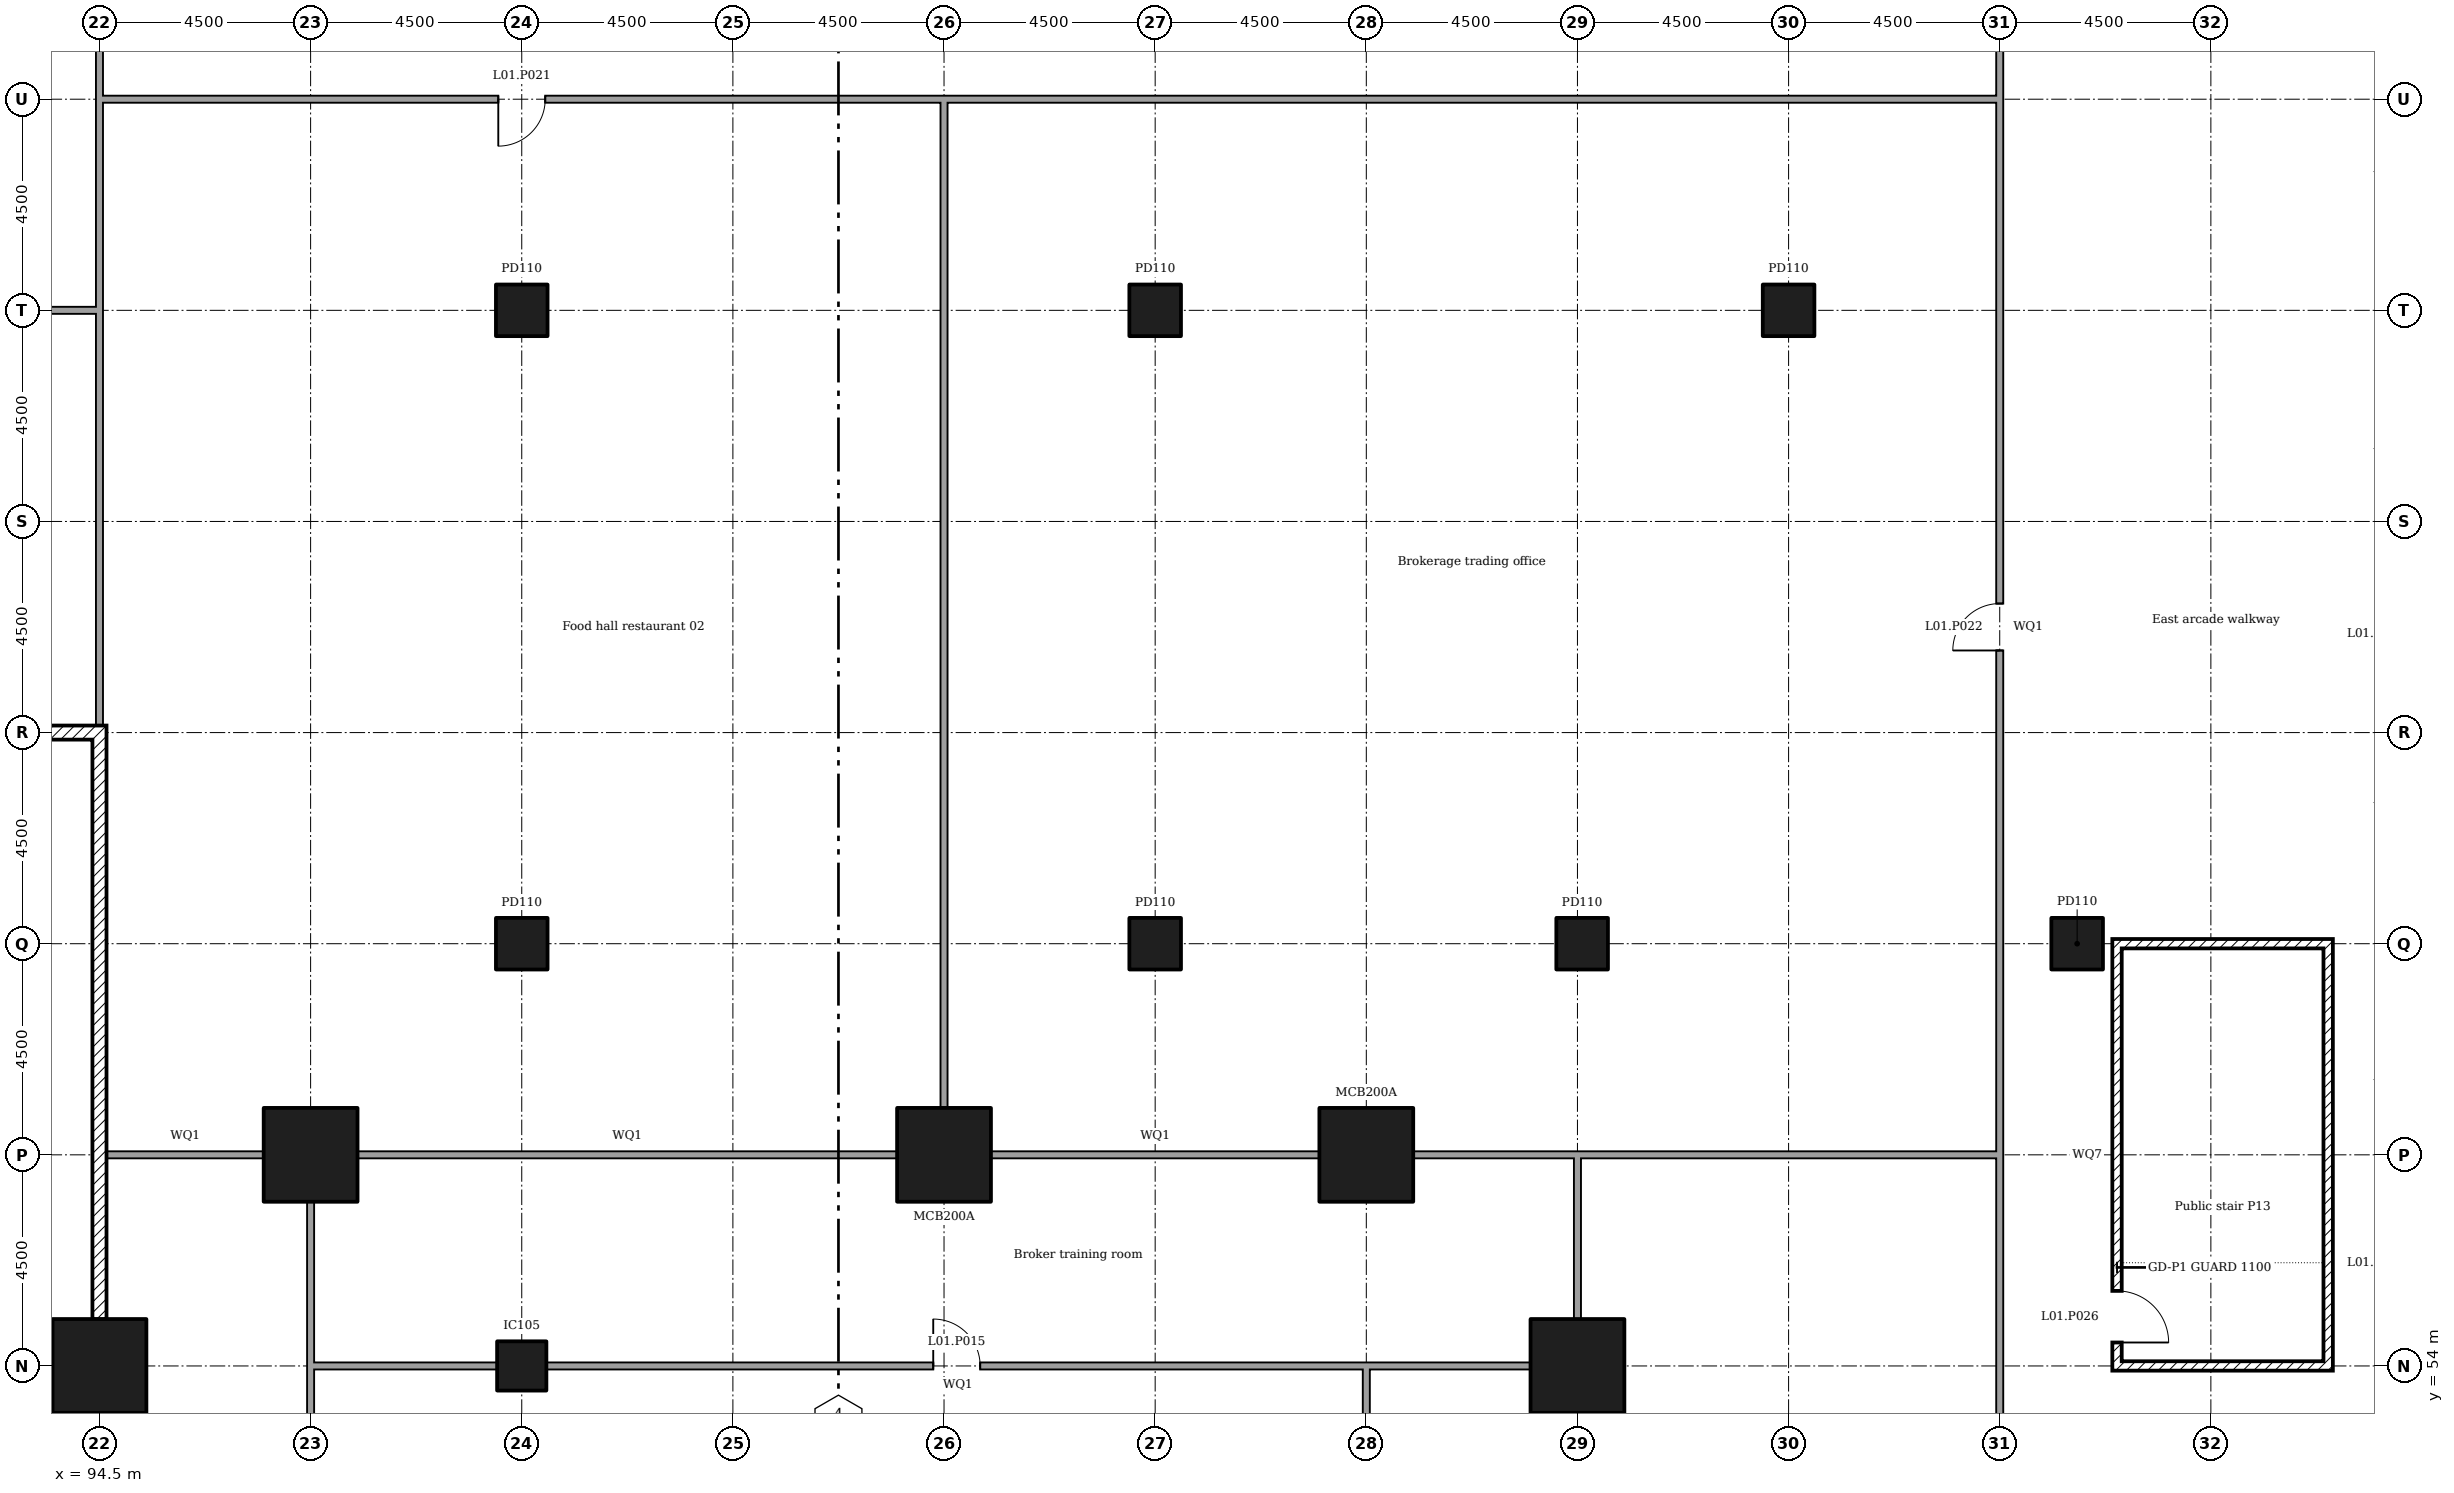
"""IFC4 building model, lengths in metres.
Left out: names, types, materials, properties, quantities, classifications, styles, units other than length and angle.
Written with IfcOpenShell. Run it as: python <this file> out.ifc"""

import sys

from ifc_helpers import new_model, si_unit, direction, frame, frame_2d, origin, origin_2d, place, context, subcontext, project, spatial, rectangle, extrude, element, fill, save


model = new_model("IFC4")
c1 = context("Model", 3, precision=1e-05, world=origin(), true_north=direction((0.0, 1.0)))
c2 = subcontext(c1, "Body", "Model", "MODEL_VIEW")
j1 = project(units=[si_unit("LENGTHUNIT", "METRE"), si_unit("PLANEANGLEUNIT", "RADIAN")], contexts=[c1])
p1 = place(None, origin())
s1 = spatial("IfcSite", under=j1, at=p1, CompositionType="ELEMENT")
p2 = place(p1, origin())
s2 = spatial("IfcBuilding", under=s1, at=p2, CompositionType="ELEMENT")
p3 = place(p2, frame((0.0, 0.0, 6.0)))
s3 = spatial("IfcBuildingStorey", under=s2, at=p3, CompositionType="ELEMENT", Elevation=6.0)
for number, where in (
    (1, (94.5, 54.0, 0.0)),
    (2, (99.0, 58.5, 0.0)),
    (3, (112.5, 58.5, 0.0)),
    (4, (121.5, 58.5, 0.0)),
    (5, (126.0, 54.0, 0.0)),
):
    element("IfcColumn", number, at=place(p3, frame(where)), inside=s3, PredefinedType="COLUMN", context=c2, shape_type="SweptSolid", body=[
        extrude(rectangle(XDim=2.0, YDim=2.0, at=origin_2d()), origin(), (0.0, 0.0, 1.0), 5.5),
    ])
p4 = place(p3, frame((103.5, 54.0, 0.0)))
e6 = element("IfcColumn", 6, at=p4, inside=s3, PredefinedType="COLUMN", context=c2, shape_type="SweptSolid", body=[
    extrude(rectangle(XDim=1.05, YDim=1.05, at=origin_2d()), origin(), (0.0, 0.0, 1.0), 5.5),
])
for number, where in (
    (7, (103.5, 63.0, 0.0)),
    (8, (103.5, 76.5, 0.0)),
    (9, (117.0, 63.0, 0.0)),
    (10, (117.0, 76.5, 0.0)),
    (11, (126.1, 63.0, 0.0)),
    (12, (130.5, 76.5, 0.0)),
    (13, (136.65, 63.0, 0.0)),
):
    element("IfcColumn", number, at=place(p3, frame(where)), inside=s3, PredefinedType="COLUMN", context=c2, shape_type="SweptSolid", body=[
        extrude(rectangle(XDim=1.1, YDim=1.1, at=origin_2d()), origin(), (0.0, 0.0, 1.0), 5.5),
    ])
p5 = place(p3, frame((81.6, 67.5, 0.0)))
e14 = element("IfcWall", 14, at=p5, inside=s3, PredefinedType="SOLIDWALL", context=c2, shape_type="SweptSolid", body=[
    extrude(rectangle(XDim=13.05, YDim=0.3, at=frame_2d((6.525, 0.0))), origin(), (0.0, 0.0, 1.0), 5.5),
])
p6 = place(p5, frame((5.6, 0.0, 0.0)))
e15 = element("IfcOpeningElement", 15, at=p6, cuts=e14, PredefinedType="OPENING", context=c2, shape_type="SweptSolid", body=[
    extrude(rectangle(XDim=1.8, YDim=2.1, at=frame_2d((0.9, 1.05))), frame((0.0, 0.16, 0.0), z_axis=(0.0, -1.0, 0.0), x_axis=(1.0, 0.0, 0.0)), (0.0, 0.0, 1.0), 0.32),
])
p7 = place(p3, frame((94.5, 45.995, 0.0), z_axis=(0.0, 0.0, 1.0), x_axis=(0.0, 1.0, 0.0)))
e16 = element("IfcWall", 16, at=p7, inside=s3, PredefinedType="SOLIDWALL", context=c2, shape_type="SweptSolid", body=[
    extrude(rectangle(XDim=7.01, YDim=0.3, at=frame_2d((3.505, 0.0))), origin(), (0.0, 0.0, 1.0), 10.05),
])
p8 = place(p7, frame((2.6, 0.0, 0.0)))
e17 = element("IfcOpeningElement", 17, at=p8, cuts=e16, PredefinedType="OPENING", context=c2, shape_type="SweptSolid", body=[
    extrude(rectangle(XDim=1.8, YDim=2.1, at=frame_2d((0.9, 1.05))), frame((0.0, 0.16, 0.0), z_axis=(0.0, -1.0, 0.0), x_axis=(1.0, 0.0, 0.0)), (0.0, 0.0, 1.0), 0.32),
])
p9 = place(p3, frame((94.5, 54.995, 0.0), z_axis=(0.0, 0.0, 1.0), x_axis=(0.0, 1.0, 0.0)))
e18 = element("IfcWall", 18, at=p9, inside=s3, PredefinedType="SOLIDWALL", context=c2, shape_type="SweptSolid", body=[
    extrude(rectangle(XDim=3.58, YDim=0.3, at=frame_2d((1.79, 0.0))), origin(), (0.0, 0.0, 1.0), 10.05),
])
p10 = place(p3, frame((94.5, 58.425, 0.0), z_axis=(0.0, 0.0, 1.0), x_axis=(0.0, 1.0, 0.0)))
e19 = element("IfcWall", 19, at=p10, inside=s3, PredefinedType="SOLIDWALL", context=c2, shape_type="SweptSolid", body=[
    extrude(rectangle(XDim=8.925, YDim=0.3, at=frame_2d((4.462, 0.0))), origin(), (0.0, 0.0, 1.0), 10.05),
])
p11 = place(p3, frame((90.545, 76.5, 0.0)))
e20 = element("IfcWall", 20, at=p11, inside=s3, PredefinedType="PARTITIONING", context=c2, shape_type="SweptSolid", body=[
    extrude(rectangle(XDim=4.03, YDim=0.15, at=frame_2d((2.015, 0.0))), origin(), (0.0, 0.0, 1.0), 5.05),
])
p12 = place(p11, frame((1.1, 0.0, 0.0)))
e21 = element("IfcOpeningElement", 21, at=p12, cuts=e20, PredefinedType="OPENING", context=c2, shape_type="SweptSolid", body=[
    extrude(rectangle(XDim=1.8, YDim=2.1, at=frame_2d((0.9, 1.05))), frame((0.0, 0.085, 0.0), z_axis=(0.0, -1.0, 0.0), x_axis=(1.0, 0.0, 0.0)), (0.0, 0.0, 1.0), 0.17),
])
p13 = place(p3, frame((94.5, 67.5, 0.0), z_axis=(0.0, 0.0, 1.0), x_axis=(0.0, 1.0, 0.0)))
e22 = element("IfcWall", 22, at=p13, inside=s3, PredefinedType="PARTITIONING", context=c2, shape_type="SweptSolid", body=[
    extrude(rectangle(XDim=8.925, YDim=0.15, at=frame_2d((4.462, 0.0))), origin(), (0.0, 0.0, 1.0), 5.05),
])
p14 = place(p3, frame((94.5, 80.925, 0.0), z_axis=(0.0, 0.0, 1.0), x_axis=(0.0, 1.0, 0.0)))
e23 = element("IfcWall", 23, at=p14, inside=s3, PredefinedType="PARTITIONING", context=c2, shape_type="SweptSolid", body=[
    extrude(rectangle(XDim=8.775, YDim=0.15, at=frame_2d((4.387, 0.0))), origin(), (0.0, 0.0, 1.0), 5.05),
])
p15 = place(p14, frame((3.525, 0.0, 0.0)))
e24 = element("IfcOpeningElement", 24, at=p15, cuts=e23, PredefinedType="OPENING", context=c2, shape_type="SweptSolid", body=[
    extrude(rectangle(XDim=1.8, YDim=2.1, at=frame_2d((0.9, 1.05))), frame((0.0, 0.085, 0.0), z_axis=(0.0, -1.0, 0.0), x_axis=(1.0, 0.0, 0.0)), (0.0, 0.0, 1.0), 0.17),
])
p16 = place(p3, frame((94.5, 76.5, 0.0), z_axis=(0.0, 0.0, 1.0), x_axis=(0.0, 1.0, 0.0)))
e25 = element("IfcWall", 25, at=p16, inside=s3, PredefinedType="PARTITIONING", context=c2, shape_type="SweptSolid", body=[
    extrude(rectangle(XDim=4.5, YDim=0.15, at=frame_2d((2.25, 0.0))), origin(), (0.0, 0.0, 1.0), 5.05),
])
p17 = place(p3, frame((135.0, 80.925, 0.0), z_axis=(0.0, 0.0, 1.0), x_axis=(0.0, 1.0, 0.0)))
e26 = element("IfcWall", 26, at=p17, inside=s3, PredefinedType="PARTITIONING", context=c2, shape_type="SweptSolid", body=[
    extrude(rectangle(XDim=8.775, YDim=0.15, at=frame_2d((4.387, 0.0))), origin(), (0.0, 0.0, 1.0), 5.05),
])
p18 = place(p17, frame((3.525, 0.0, 0.0)))
e27 = element("IfcOpeningElement", 27, at=p18, cuts=e26, PredefinedType="OPENING", context=c2, shape_type="SweptSolid", body=[
    extrude(rectangle(XDim=1.8, YDim=2.1, at=frame_2d((0.9, 1.05))), frame((0.0, 0.085, 0.0), z_axis=(0.0, -1.0, 0.0), x_axis=(1.0, 0.0, 0.0)), (0.0, 0.0, 1.0), 0.17),
])
p19 = place(p3, frame((135.0, 40.5, 0.0), z_axis=(0.0, 0.0, 1.0), x_axis=(0.0, 1.0, 0.0)))
e28 = element("IfcWall", 28, at=p19, inside=s3, PredefinedType="PARTITIONING", context=c2, shape_type="SweptSolid", body=[
    extrude(rectangle(XDim=18.075, YDim=0.15, at=frame_2d((9.038, 0.0))), origin(), (0.0, 0.0, 1.0), 5.05),
])
p20 = place(p19, frame((7.3, 0.0, 0.0)))
e29 = element("IfcOpeningElement", 29, at=p20, cuts=e28, PredefinedType="OPENING", context=c2, shape_type="SweptSolid", body=[
    extrude(rectangle(XDim=1.0, YDim=2.1, at=frame_2d((0.5, 1.05))), frame((0.0, 0.085, 0.0), z_axis=(0.0, -1.0, 0.0), x_axis=(1.0, 0.0, 0.0)), (0.0, 0.0, 1.0), 0.17),
])
p21 = place(p3, frame((135.0, 58.5, 0.0), z_axis=(0.0, 0.0, 1.0), x_axis=(0.0, 1.0, 0.0)))
e30 = element("IfcWall", 30, at=p21, inside=s3, PredefinedType="PARTITIONING", context=c2, shape_type="SweptSolid", body=[
    extrude(rectangle(XDim=22.5, YDim=0.15, at=frame_2d((11.25, 0.0))), origin(), (0.0, 0.0, 1.0), 5.05),
])
p22 = place(p21, frame((10.75, 0.0, 0.0)))
e31 = element("IfcOpeningElement", 31, at=p22, cuts=e30, PredefinedType="OPENING", context=c2, shape_type="SweptSolid", body=[
    extrude(rectangle(XDim=1.0, YDim=2.1, at=frame_2d((0.5, 1.05))), frame((0.0, 0.085, 0.0), z_axis=(0.0, -1.0, 0.0), x_axis=(1.0, 0.0, 0.0)), (0.0, 0.0, 1.0), 0.17),
])
p23 = place(p3, frame((137.5, 53.9, 0.0), z_axis=(0.0, 0.0, 1.0), x_axis=(0.0, 1.0, 0.0)))
e32 = element("IfcWall", 32, at=p23, inside=s3, PredefinedType="SOLIDWALL", context=c2, shape_type="SweptSolid", body=[
    extrude(rectangle(XDim=9.2, YDim=0.2, at=frame_2d((4.6, 0.0))), origin(), (0.0, 0.0, 1.0), 5.05),
])
p24 = place(p23, frame((0.6, 0.0, 0.0)))
e33 = element("IfcOpeningElement", 33, at=p24, cuts=e32, PredefinedType="OPENING", context=c2, shape_type="SweptSolid", body=[
    extrude(rectangle(XDim=1.1, YDim=2.1, at=frame_2d((0.55, 1.05))), frame((0.0, 0.11, 0.0), z_axis=(0.0, -1.0, 0.0), x_axis=(1.0, 0.0, 0.0)), (0.0, 0.0, 1.0), 0.22),
])
p25 = place(p3, frame((142.0, 53.9, 0.0), z_axis=(0.0, 0.0, 1.0), x_axis=(0.0, 1.0, 0.0)))
e34 = element("IfcWall", 34, at=p25, inside=s3, PredefinedType="SOLIDWALL", context=c2, shape_type="SweptSolid", body=[
    extrude(rectangle(XDim=9.2, YDim=0.2, at=frame_2d((4.6, 0.0))), origin(), (0.0, 0.0, 1.0), 5.05),
])
for number, where in (
    (35, (137.6, 54.0, 0.0)),
    (36, (137.6, 63.0, 0.0)),
):
    element("IfcWall", number, at=place(p3, frame(where)), inside=s3, PredefinedType="SOLIDWALL", context=c2, shape_type="SweptSolid", body=[
        extrude(rectangle(XDim=4.3, YDim=0.2, at=frame_2d((2.15, 0.0))), origin(), (0.0, 0.0, 1.0), 5.05),
    ])
p26 = place(p3, frame((94.575, 81.0, 0.0)))
e37 = element("IfcWall", 37, at=p26, inside=s3, PredefinedType="PARTITIONING", context=c2, shape_type="SweptSolid", body=[
    extrude(rectangle(XDim=18.0, YDim=0.15, at=frame_2d((9.0, 0.0))), origin(), (0.0, 0.0, 1.0), 5.05),
])
p27 = place(p26, frame((8.425, 0.0, 0.0)))
e38 = element("IfcOpeningElement", 38, at=p27, cuts=e37, PredefinedType="OPENING", context=c2, shape_type="SweptSolid", body=[
    extrude(rectangle(XDim=1.0, YDim=2.1, at=frame_2d((0.5, 1.05))), frame((0.0, 0.085, 0.0), z_axis=(0.0, -1.0, 0.0), x_axis=(1.0, 0.0, 0.0)), (0.0, 0.0, 1.0), 0.17),
])
p28 = place(p3, frame((112.5, 81.0, 0.0)))
e39 = element("IfcWall", 39, at=p28, inside=s3, PredefinedType="PARTITIONING", context=c2, shape_type="SweptSolid", body=[
    extrude(rectangle(XDim=22.425, YDim=0.15, at=frame_2d((11.212, 0.0))), origin(), (0.0, 0.0, 1.0), 5.05),
])
p29 = place(p3, frame((99.0, 36.52, 0.0), z_axis=(0.0, 0.0, 1.0), x_axis=(0.0, 1.0, 0.0)))
e40 = element("IfcWall", 40, at=p29, inside=s3, PredefinedType="PARTITIONING", context=c2, shape_type="SweptSolid", body=[
    extrude(rectangle(XDim=17.555, YDim=0.15, at=frame_2d((8.777, 0.0))), origin(), (0.0, 0.0, 1.0), 5.05),
])
p30 = place(p29, frame((7.85, 0.0, 0.0)))
e41 = element("IfcOpeningElement", 41, at=p30, cuts=e40, PredefinedType="OPENING", context=c2, shape_type="SweptSolid", body=[
    extrude(rectangle(XDim=1.8, YDim=2.1, at=frame_2d((0.9, 1.05))), frame((0.0, 0.085, 0.0), z_axis=(0.0, -1.0, 0.0), x_axis=(1.0, 0.0, 0.0)), (0.0, 0.0, 1.0), 0.17),
])
p31 = place(p3, frame((99.0, 54.0, 0.0), z_axis=(0.0, 0.0, 1.0), x_axis=(0.0, 1.0, 0.0)))
e42 = element("IfcWall", 42, at=p31, inside=s3, PredefinedType="PARTITIONING", context=c2, shape_type="SweptSolid", body=[
    extrude(rectangle(XDim=3.505, YDim=0.15, at=frame_2d((1.752, 0.0))), origin(), (0.0, 0.0, 1.0), 5.05),
])
p32 = place(p3, frame((94.65, 58.5, 0.0)))
e43 = element("IfcWall", 43, at=p32, inside=s3, PredefinedType="PARTITIONING", context=c2, shape_type="SweptSolid", body=[
    extrude(rectangle(XDim=3.355, YDim=0.15, at=frame_2d((1.677, 0.0))), origin(), (0.0, 0.0, 1.0), 5.05),
])
p33 = place(p3, frame((99.075, 54.0, 0.0)))
e44 = element("IfcWall", 44, at=p33, inside=s3, PredefinedType="PARTITIONING", context=c2, shape_type="SweptSolid", body=[
    extrude(rectangle(XDim=3.905, YDim=0.15, at=frame_2d((1.953, 0.0))), origin(), (0.0, 0.0, 1.0), 5.05),
])
p34 = place(p3, frame((104.02, 54.0, 0.0)))
e45 = element("IfcWall", 45, at=p34, inside=s3, PredefinedType="PARTITIONING", context=c2, shape_type="SweptSolid", body=[
    extrude(rectangle(XDim=17.555, YDim=0.15, at=frame_2d((8.777, 0.0))), origin(), (0.0, 0.0, 1.0), 5.05),
])
p35 = place(p34, frame((8.25, 0.0, 0.0)))
e46 = element("IfcOpeningElement", 46, at=p35, cuts=e45, PredefinedType="OPENING", context=c2, shape_type="SweptSolid", body=[
    extrude(rectangle(XDim=1.0, YDim=2.1, at=frame_2d((0.5, 1.05))), frame((0.0, 0.085, 0.0), z_axis=(0.0, -1.0, 0.0), x_axis=(1.0, 0.0, 0.0)), (0.0, 0.0, 1.0), 0.17),
])
p36 = place(p3, frame((121.5, 50.02, 0.0), z_axis=(0.0, 0.0, 1.0), x_axis=(0.0, 1.0, 0.0)))
e47 = element("IfcWall", 47, at=p36, inside=s3, PredefinedType="PARTITIONING", context=c2, shape_type="SweptSolid", body=[
    extrude(rectangle(XDim=3.905, YDim=0.15, at=frame_2d((1.953, 0.0))), origin(), (0.0, 0.0, 1.0), 5.05),
])
p37 = place(p3, frame((121.5, 54.0, 0.0)))
e48 = element("IfcWall", 48, at=p37, inside=s3, PredefinedType="PARTITIONING", context=c2, shape_type="SweptSolid", body=[
    extrude(rectangle(XDim=3.505, YDim=0.15, at=frame_2d((1.752, 0.0))), origin(), (0.0, 0.0, 1.0), 5.05),
])
p38 = place(p3, frame((126.0, 54.995, 0.0), z_axis=(0.0, 0.0, 1.0), x_axis=(0.0, 1.0, 0.0)))
e49 = element("IfcWall", 49, at=p38, inside=s3, PredefinedType="PARTITIONING", context=c2, shape_type="SweptSolid", body=[
    extrude(rectangle(XDim=3.58, YDim=0.15, at=frame_2d((1.79, 0.0))), origin(), (0.0, 0.0, 1.0), 5.05),
])
p39 = place(p3, frame((99.995, 58.5, 0.0)))
e50 = element("IfcWall", 50, at=p39, inside=s3, PredefinedType="PARTITIONING", context=c2, shape_type="SweptSolid", body=[
    extrude(rectangle(XDim=11.51, YDim=0.15, at=frame_2d((5.755, 0.0))), origin(), (0.0, 0.0, 1.0), 5.05),
])
p40 = place(p3, frame((113.495, 58.5, 0.0)))
e51 = element("IfcWall", 51, at=p40, inside=s3, PredefinedType="PARTITIONING", context=c2, shape_type="SweptSolid", body=[
    extrude(rectangle(XDim=7.01, YDim=0.15, at=frame_2d((3.505, 0.0))), origin(), (0.0, 0.0, 1.0), 5.05),
])
p41 = place(p3, frame((122.495, 58.5, 0.0)))
e52 = element("IfcWall", 52, at=p41, inside=s3, PredefinedType="PARTITIONING", context=c2, shape_type="SweptSolid", body=[
    extrude(rectangle(XDim=3.43, YDim=0.15, at=frame_2d((1.715, 0.0))), origin(), (0.0, 0.0, 1.0), 5.05),
])
p42 = place(p3, frame((126.0, 45.995, 0.0), z_axis=(0.0, 0.0, 1.0), x_axis=(0.0, 1.0, 0.0)))
e53 = element("IfcWall", 53, at=p42, inside=s3, PredefinedType="PARTITIONING", context=c2, shape_type="SweptSolid", body=[
    extrude(rectangle(XDim=7.01, YDim=0.15, at=frame_2d((3.505, 0.0))), origin(), (0.0, 0.0, 1.0), 5.05),
])
p43 = place(p3, frame((126.0, 58.5, 0.0)))
e54 = element("IfcWall", 54, at=p43, inside=s3, PredefinedType="PARTITIONING", context=c2, shape_type="SweptSolid", body=[
    extrude(rectangle(XDim=8.925, YDim=0.15, at=frame_2d((4.462, 0.0))), origin(), (0.0, 0.0, 1.0), 5.05),
])
p44 = place(p3, frame((112.5, 59.495, 0.0), z_axis=(0.0, 0.0, 1.0), x_axis=(0.0, 1.0, 0.0)))
e55 = element("IfcWall", 55, at=p44, inside=s3, PredefinedType="PARTITIONING", context=c2, shape_type="SweptSolid", body=[
    extrude(rectangle(XDim=21.43, YDim=0.15, at=frame_2d((10.715, 0.0))), origin(), (0.0, 0.0, 1.0), 5.05),
])
p45 = place(p35, origin())
e56 = element("IfcDoor", 56, at=p45, inside=s3, OperationType="SINGLE_SWING_RIGHT", PredefinedType="DOOR", context=c2, shape_type="SweptSolid", body=[
    extrude(rectangle(XDim=1.0, YDim=2.1, at=frame_2d((0.5, 1.05))), frame((0.0, 0.025, 0.0), z_axis=(0.0, -1.0, 0.0), x_axis=(1.0, 0.0, 0.0)), (0.0, 0.0, 1.0), 0.05),
])
fill(e46, e56)
p46 = place(p27, frame((1.0, 0.0, 0.0), x_axis=(-1.0, 0.0, 0.0)))
e57 = element("IfcDoor", 57, at=p46, inside=s3, OperationType="SINGLE_SWING_LEFT", PredefinedType="DOOR", context=c2, shape_type="SweptSolid", body=[
    extrude(rectangle(XDim=1.0, YDim=2.1, at=frame_2d((0.5, 1.05))), frame((0.0, 0.025, 0.0), z_axis=(0.0, -1.0, 0.0), x_axis=(1.0, 0.0, 0.0)), (0.0, 0.0, 1.0), 0.05),
])
fill(e38, e57)
p47 = place(p22, origin())
e58 = element("IfcDoor", 58, at=p47, inside=s3, OperationType="SINGLE_SWING_RIGHT", PredefinedType="DOOR", context=c2, shape_type="SweptSolid", body=[
    extrude(rectangle(XDim=1.0, YDim=2.1, at=frame_2d((0.5, 1.05))), frame((0.0, 0.025, 0.0), z_axis=(0.0, -1.0, 0.0), x_axis=(1.0, 0.0, 0.0)), (0.0, 0.0, 1.0), 0.05),
])
fill(e31, e58)
p48 = place(p24, frame((1.1, 0.0, 0.0), x_axis=(-1.0, 0.0, 0.0)))
e59 = element("IfcDoor", 59, at=p48, inside=s3, OperationType="SINGLE_SWING_LEFT", PredefinedType="DOOR", context=c2, shape_type="SweptSolid", body=[
    extrude(rectangle(XDim=1.1, YDim=2.1, at=frame_2d((0.55, 1.05))), frame((0.0, 0.025, 0.0), z_axis=(0.0, -1.0, 0.0), x_axis=(1.0, 0.0, 0.0)), (0.0, 0.0, 1.0), 0.05),
])
fill(e33, e59)
save(model, sys.argv[1])
